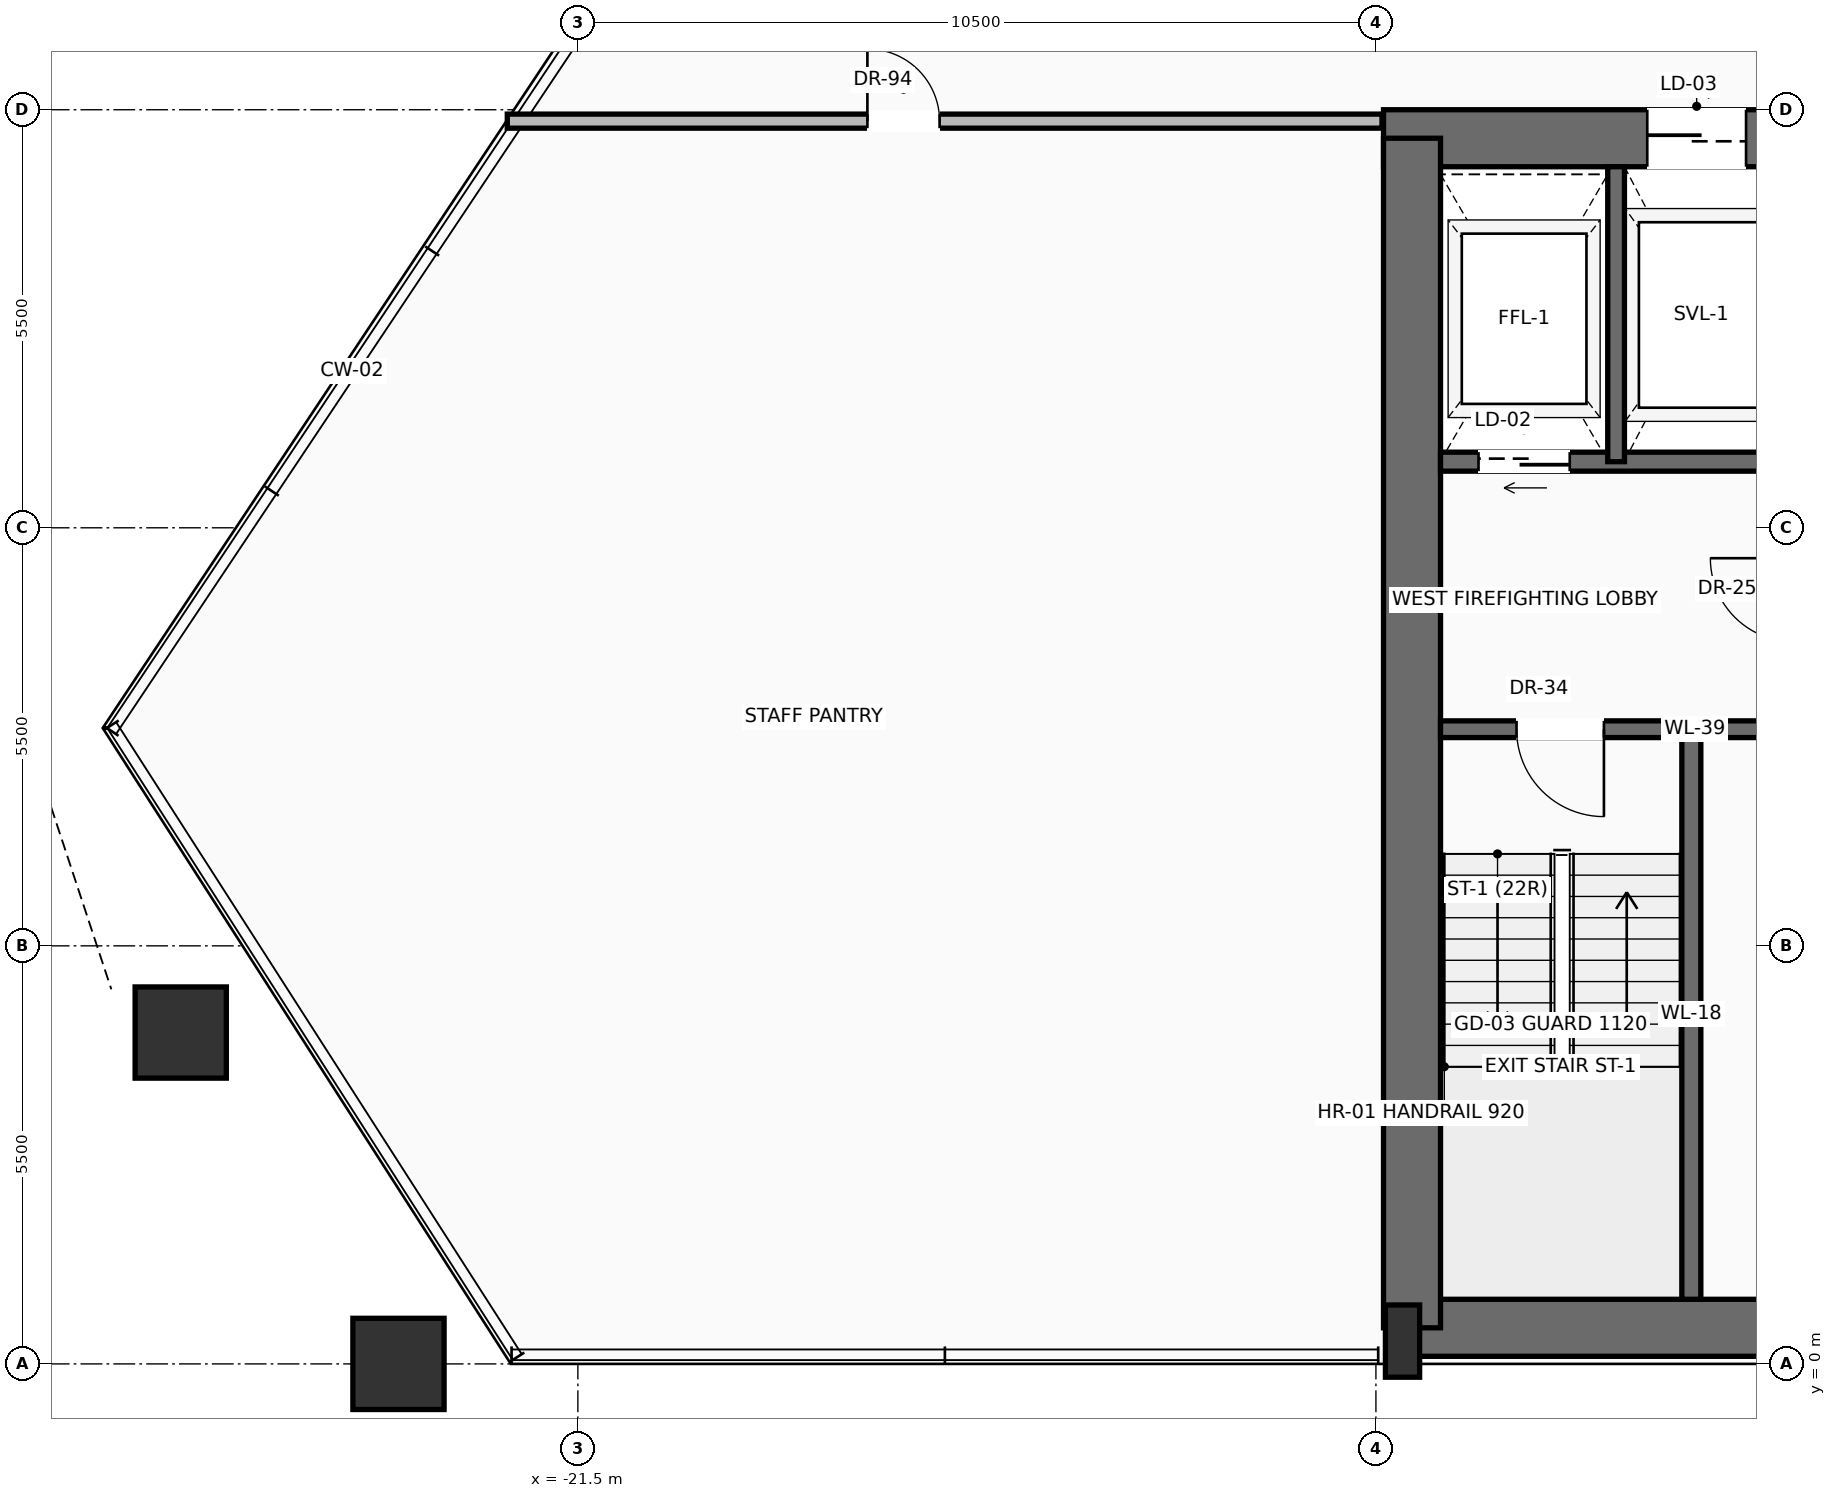
"""IFC4 building model, lengths in metres.
Left out: names, types, materials, properties, quantities, classifications, styles, units other than length and angle.
Written with IfcOpenShell. Run it as: python <this file> out.ifc"""

import sys

from ifc_helpers import new_model, si_unit, direction, frame, frame_2d, origin, origin_2d, place, context, subcontext, project, spatial, rectangle, hollow_rectangle, extrude, source, transform, mapped, element, fill, save


model = new_model("IFC4")
c1 = context("Model", 3, precision=1e-05, world=origin(), true_north=direction((0.0, 1.0)))
c2 = subcontext(c1, "Body", "Model", "MODEL_VIEW")
j1 = project(units=[si_unit("LENGTHUNIT", "METRE"), si_unit("PLANEANGLEUNIT", "RADIAN")], contexts=[c1])
p1 = place(None, origin())
s1 = spatial("IfcSite", under=j1, at=p1, CompositionType="ELEMENT")
p2 = place(p1, origin())
s2 = spatial("IfcBuilding", under=s1, at=p2, CompositionType="ELEMENT")
p3 = place(p2, frame((0.0, 0.0, 113.6)))
s3 = spatial("IfcBuildingStorey", under=s2, at=p3, CompositionType="ELEMENT", Elevation=113.6)
p4 = place(p3, frame((-10.65, 0.475, 0.0), z_axis=(0.0, 0.0, 1.0), x_axis=(1.0, 0.0, 0.0)))
e1 = element("IfcWall", 1, at=p4, inside=s3, PredefinedType="SHEAR", context=c2, shape_type="SweptSolid", body=[
    extrude(rectangle(XDim=21.3, YDim=0.75, at=frame_2d((10.65, 0.0))), origin(), (0.0, 0.0, 1.0), 3.45),
])
p5 = place(p3, frame((-10.9, 16.125, 0.0), z_axis=(0.0, 0.0, 1.0), x_axis=(1.0, 0.0, 0.0)))
e2 = element("IfcWall", 2, at=p5, inside=s3, PredefinedType="SHEAR", context=c2, shape_type="SweptSolid", body=[
    extrude(rectangle(XDim=21.8, YDim=0.75, at=frame_2d((10.9, 0.0))), origin(), (0.0, 0.0, 1.0), 3.45),
])
p6 = place(p5, frame((3.47, 0.0, 0.0)))
e3 = element("IfcOpeningElement", 3, at=p6, cuts=e2, PredefinedType="OPENING", context=c2, shape_type="SweptSolid", body=[
    extrude(rectangle(XDim=1.3, YDim=2.3, at=frame_2d((0.65, 1.15))), frame((0.0, 0.385, 0.0), z_axis=(0.0, -1.0, 0.0), x_axis=(1.0, 0.0, 0.0)), (0.0, 0.0, 1.0), 0.77),
])
p7 = place(p5, frame((9.9, 0.0, 0.0)))
e4 = element("IfcOpeningElement", 4, at=p7, cuts=e2, PredefinedType="OPENING", context=c2, shape_type="SweptSolid", body=[
    extrude(rectangle(XDim=2.0, YDim=2.4, at=frame_2d((1.0, 1.2))), frame((0.0, 0.385, 0.0), z_axis=(0.0, -1.0, 0.0), x_axis=(1.0, 0.0, 0.0)), (0.0, 0.0, 1.0), 0.77),
])
p8 = place(p3, frame((-10.525, 0.475, 0.0), z_axis=(0.0, 0.0, 1.0), x_axis=(0.0, 1.0, 0.0)))
e5 = element("IfcWall", 5, at=p8, inside=s3, PredefinedType="SHEAR", context=c2, shape_type="SweptSolid", body=[
    extrude(rectangle(XDim=15.65, YDim=0.75, at=frame_2d((7.825, 0.0))), origin(), (0.0, 0.0, 1.0), 3.45),
])
m1 = source(origin(), c2, "Body", "SweptSolid", [
    extrude(rectangle(XDim=0.45, YDim=0.95, at=origin_2d()), origin(), (0.0, 0.0, 1.0), 3.7),
])
p9 = place(p3, frame((-10.65, 0.3, 0.0), z_axis=(0.0, 0.0, 1.0), x_axis=(1.0, 0.0, 0.0)))
e6 = element("IfcColumn", 6, at=p9, inside=s3, PredefinedType="PILASTER", context=c2, shape_type="MappedRepresentation", body=[
    mapped(m1, transform((0.0, 0.0, 0.0), scale=1.0)),
])
m2 = source(origin(), c2, "Body", "SweptSolid", [
    extrude(hollow_rectangle(XDim=1.2, YDim=1.2, WallThickness=0.06, at=origin_2d()), origin(), (0.0, 0.0, 1.0), 3.691),
])
p10 = place(p3, frame((-23.86, 0.0, 0.004), z_axis=(-0.012962731142, 0.0, 0.999915980271), x_axis=(0.0, -1.0, 0.0)))
e7 = element("IfcColumn", 7, at=p10, inside=s3, PredefinedType="COLUMN", context=c2, shape_type="MappedRepresentation", body=[
    mapped(m2, transform((0.0, 0.0, 0.0), scale=1.0)),
])
m3 = source(origin(), c2, "Body", "SweptSolid", [
    extrude(hollow_rectangle(XDim=1.2, YDim=1.2, WallThickness=0.06, at=origin_2d()), origin(), (0.0, 0.0, 1.0), 3.692),
])
p11 = place(p3, frame((-26.725, 4.359, 0.004), z_axis=(-0.00112425736, -0.016599329254, 0.999861589578), x_axis=(0.997714246569, -0.06757427168, 0.0)))
e8 = element("IfcColumn", 8, at=p11, inside=s3, PredefinedType="COLUMN", context=c2, shape_type="MappedRepresentation", body=[
    mapped(m3, transform((0.0, 0.0, 0.0), scale=1.0)),
])
p12 = place(p3, frame((-6.85, 0.85, 0.0), z_axis=(0.0, 0.0, 1.0), x_axis=(0.0, 1.0, 0.0)))
e9 = element("IfcWall", 9, at=p12, inside=s3, PredefinedType="SOLIDWALL", context=c2, shape_type="SweptSolid", body=[
    extrude(rectangle(XDim=7.5, YDim=0.25, at=frame_2d((3.75, 0.0))), origin(), (0.0, 0.0, 1.0), 3.45),
])
p13 = place(p3, frame((-5.5, 8.35, 0.0), z_axis=(0.0, 0.0, 1.0), x_axis=(-1.0, 0.0, 0.0)))
e10 = element("IfcWall", 10, at=p13, inside=s3, PredefinedType="SOLIDWALL", context=c2, shape_type="SweptSolid", body=[
    extrude(rectangle(XDim=4.65, YDim=0.22, at=frame_2d((2.325, 0.0))), origin(), (0.0, 0.0, 1.0), 3.45),
])
p14 = place(p13, frame((2.5, 0.0, 0.0)))
e11 = element("IfcOpeningElement", 11, at=p14, cuts=e10, PredefinedType="OPENING", context=c2, shape_type="SweptSolid", body=[
    extrude(rectangle(XDim=1.15, YDim=2.2, at=frame_2d((0.575, 1.1))), frame((0.0, 0.12, 0.0), z_axis=(0.0, -1.0, 0.0), x_axis=(1.0, 0.0, 0.0)), (0.0, 0.0, 1.0), 0.24),
])
p15 = place(p3, frame((-5.5, 11.87, 0.0), z_axis=(0.0, 0.0, 1.0), x_axis=(-1.0, 0.0, 0.0)))
e12 = element("IfcWall", 12, at=p15, inside=s3, PredefinedType="SOLIDWALL", context=c2, shape_type="SweptSolid", body=[
    extrude(rectangle(XDim=4.65, YDim=0.25, at=frame_2d((2.325, 0.0))), origin(), (0.0, 0.0, 1.0), 3.45),
])
p16 = place(p15, frame((2.95, 0.0, 0.0)))
e13 = element("IfcOpeningElement", 13, at=p16, cuts=e12, PredefinedType="OPENING", context=c2, shape_type="SweptSolid", body=[
    extrude(rectangle(XDim=1.2, YDim=2.25, at=frame_2d((0.6, 1.125))), frame((0.0, 0.135, 0.0), z_axis=(0.0, -1.0, 0.0), x_axis=(1.0, 0.0, 0.0)), (0.0, 0.0, 1.0), 0.27),
])
p17 = place(p3, frame((-7.84, 11.87, 0.0), z_axis=(0.0, 0.0, 1.0), x_axis=(0.0, 1.0, 0.0)))
e14 = element("IfcWall", 14, at=p17, inside=s3, PredefinedType="SOLIDWALL", context=c2, shape_type="SweptSolid", body=[
    extrude(rectangle(XDim=3.88, YDim=0.22, at=frame_2d((1.94, 0.0))), origin(), (0.0, 0.0, 1.0), 3.45),
])
p18 = place(p3, frame((-22.429, 16.35, 0.0), z_axis=(0.0, 0.0, 1.0), x_axis=(1.0, 0.0, 0.0)))
e15 = element("IfcWall", 15, at=p18, inside=s3, PredefinedType="PARTITIONING", context=c2, shape_type="SweptSolid", body=[
    extrude(rectangle(XDim=11.509, YDim=0.185, at=frame_2d((5.754, 0.0))), origin(), (0.0, 0.0, 1.0), 2.747),
])
p19 = place(p18, frame((4.738, 0.0, 0.0)))
e16 = element("IfcOpeningElement", 16, at=p19, cuts=e15, PredefinedType="OPENING", context=c2, shape_type="SweptSolid", body=[
    extrude(rectangle(XDim=0.95, YDim=2.2, at=frame_2d((0.475, 1.1))), frame((0.0, 0.103, 0.0), z_axis=(0.0, -1.0, 0.0), x_axis=(1.0, 0.0, 0.0)), (0.0, 0.0, 1.0), 0.205),
])
m4 = source(origin(), c2, "Body", "SweptSolid", [
    extrude(rectangle(XDim=1.15, YDim=2.2, at=frame_2d((0.575, 1.1))), frame((0.0, 0.025, 0.0), z_axis=(0.0, -1.0, 0.0), x_axis=(1.0, 0.0, 0.0)), (0.0, 0.0, 1.0), 0.05),
])
p20 = place(p14, origin())
e17 = element("IfcDoor", 17, at=p20, inside=s3, OperationType="SINGLE_SWING_LEFT", PredefinedType="DOOR", context=c2, shape_type="MappedRepresentation", body=[
    mapped(m4, transform((0.0, 0.0, 0.0), scale=1.0)),
])
fill(e11, e17)
m5 = source(origin(), c2, "Body", "SweptSolid", [
    extrude(rectangle(XDim=1.2, YDim=2.25, at=frame_2d((0.6, 1.125))), frame((0.0, 0.025, 0.0), z_axis=(0.0, -1.0, 0.0), x_axis=(1.0, 0.0, 0.0)), (0.0, 0.0, 1.0), 0.05),
])
p21 = place(p16, origin())
e18 = element("IfcDoor", 18, at=p21, inside=s3, OperationType="SLIDING_TO_LEFT", PredefinedType="DOOR", context=c2, shape_type="MappedRepresentation", body=[
    mapped(m5, transform((0.0, 0.0, 0.0), scale=1.0)),
])
fill(e13, e18)
m6 = source(origin(), c2, "Body", "SweptSolid", [
    extrude(rectangle(XDim=1.3, YDim=2.3, at=frame_2d((0.65, 1.15))), frame((0.0, 0.025, 0.0), z_axis=(0.0, -1.0, 0.0), x_axis=(1.0, 0.0, 0.0)), (0.0, 0.0, 1.0), 0.05),
])
p22 = place(p6, origin())
e19 = element("IfcDoor", 19, at=p22, inside=s3, OperationType="SLIDING_TO_RIGHT", PredefinedType="DOOR", context=c2, shape_type="MappedRepresentation", body=[
    mapped(m6, transform((0.0, 0.0, 0.0), scale=1.0)),
])
fill(e3, e19)
m7 = source(origin(), c2, "Body", "SweptSolid", [
    extrude(rectangle(XDim=0.95, YDim=2.2, at=frame_2d((0.475, 1.1))), frame((0.0, 0.025, 0.0), z_axis=(0.0, -1.0, 0.0), x_axis=(1.0, 0.0, 0.0)), (0.0, 0.0, 1.0), 0.05),
])
p23 = place(p19, origin())
e20 = element("IfcDoor", 20, at=p23, inside=s3, OperationType="SINGLE_SWING_LEFT", PredefinedType="DOOR", context=c2, shape_type="MappedRepresentation", body=[
    mapped(m7, transform((0.0, 0.0, 0.0), scale=1.0)),
])
fill(e16, e20)
save(model, sys.argv[1])
